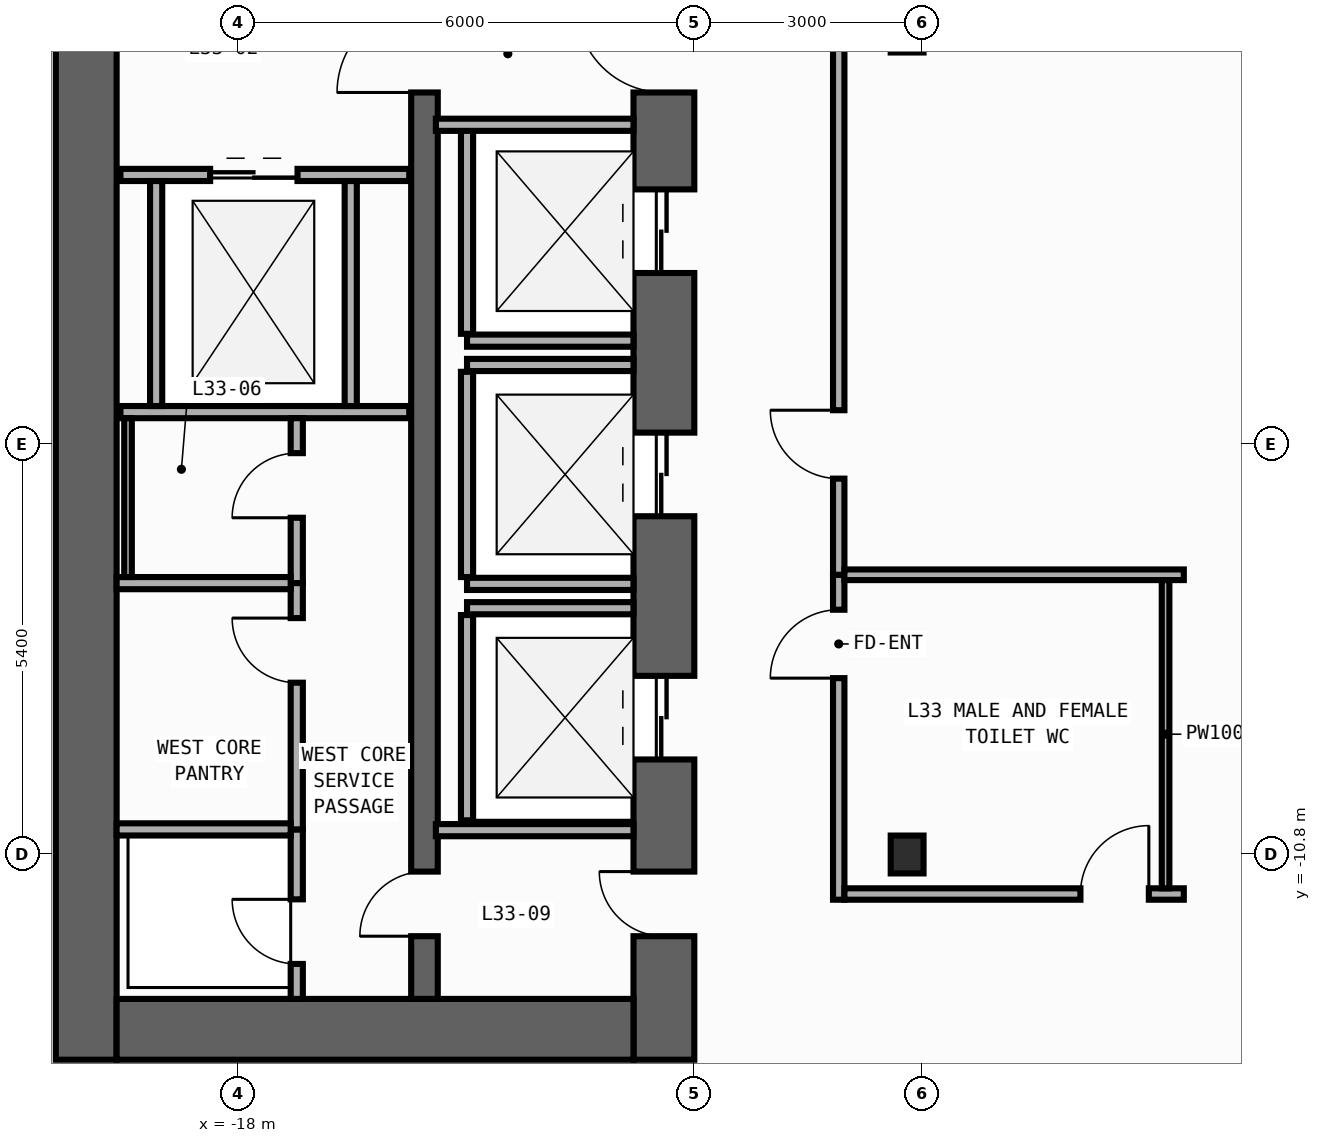
"""IFC4 building model, lengths in metres.
Left out: names, types, materials, properties, quantities, classifications, styles, units other than length and angle.
Written with IfcOpenShell. Run it as: python <this file> out.ifc"""

import sys

from ifc_helpers import new_model, si_unit, direction, frame, frame_2d, origin, origin_2d, place, context, subcontext, project, spatial, rectangle, i_section, extrude, element, fill, save


model = new_model("IFC4")
c1 = context("Model", 3, precision=1e-05, world=origin(), true_north=direction((0.0, 1.0)))
c2 = subcontext(c1, "Body", "Model", "MODEL_VIEW")
j1 = project(units=[si_unit("LENGTHUNIT", "METRE"), si_unit("PLANEANGLEUNIT", "RADIAN")], contexts=[c1])
p1 = place(None, origin())
s1 = spatial("IfcSite", under=j1, at=p1, CompositionType="ELEMENT")
p2 = place(p1, origin())
s2 = spatial("IfcBuilding", under=s1, at=p2, CompositionType="ELEMENT")
p3 = place(p2, frame((0.0, 0.0, 143.6)))
s3 = spatial("IfcBuildingStorey", under=s2, at=p3, CompositionType="ELEMENT", Elevation=143.6)
p4 = place(p3, frame((-20.0, -13.5, 0.0), z_axis=(0.0, 0.0, 1.0), x_axis=(0.0, 1.0, 0.0)))
e1 = element("IfcWall", 1, at=p4, inside=s3, PredefinedType="SHEAR", context=c2, shape_type="SweptSolid", body=[
    extrude(rectangle(XDim=27.0, YDim=0.8, at=frame_2d((13.5, 0.0))), origin(), (0.0, 0.0, 1.0), 3.94),
])
p5 = place(p3, frame((-12.4, -13.5, 0.0), z_axis=(0.0, 0.0, 1.0), x_axis=(0.0, 1.0, 0.0)))
e2 = element("IfcWall", 2, at=p5, inside=s3, PredefinedType="SHEAR", context=c2, shape_type="SweptSolid", body=[
    extrude(rectangle(XDim=27.0, YDim=0.8, at=frame_2d((13.5, 0.0))), origin(), (0.0, 0.0, 1.0), 3.94),
])
p6 = place(p5, frame((10.35, 0.0, 0.0)))
e3 = element("IfcOpeningElement", 3, at=p6, cuts=e2, PredefinedType="OPENING", context=c2, shape_type="SweptSolid", body=[
    extrude(rectangle(XDim=1.1, YDim=2.2, at=frame_2d((0.55, 1.1))), frame((0.0, 0.41, 0.0), z_axis=(0.0, -1.0, 0.0), x_axis=(1.0, 0.0, 0.0)), (0.0, 0.0, 1.0), 0.82),
])
p7 = place(p5, frame((7.15, 0.0, 0.0)))
e4 = element("IfcOpeningElement", 4, at=p7, cuts=e2, PredefinedType="OPENING", context=c2, shape_type="SweptSolid", body=[
    extrude(rectangle(XDim=1.1, YDim=2.2, at=frame_2d((0.55, 1.1))), frame((0.0, 0.41, 0.0), z_axis=(0.0, -1.0, 0.0), x_axis=(1.0, 0.0, 0.0)), (0.0, 0.0, 1.0), 0.82),
])
p8 = place(p5, frame((3.95, 0.0, 0.0)))
e5 = element("IfcOpeningElement", 5, at=p8, cuts=e2, PredefinedType="OPENING", context=c2, shape_type="SweptSolid", body=[
    extrude(rectangle(XDim=1.1, YDim=2.2, at=frame_2d((0.55, 1.1))), frame((0.0, 0.41, 0.0), z_axis=(0.0, -1.0, 0.0), x_axis=(1.0, 0.0, 0.0)), (0.0, 0.0, 1.0), 0.82),
])
p9 = place(p5, frame((15.175, 0.0, 0.0)))
e6 = element("IfcOpeningElement", 6, at=p9, cuts=e2, PredefinedType="OPENING", context=c2, shape_type="SweptSolid", body=[
    extrude(rectangle(XDim=0.85, YDim=2.1, at=frame_2d((0.425, 1.05))), frame((0.0, 0.41, 0.0), z_axis=(0.0, -1.0, 0.0), x_axis=(1.0, 0.0, 0.0)), (0.0, 0.0, 1.0), 0.82),
])
p10 = place(p5, frame((21.275, 0.0, 0.0)))
e7 = element("IfcOpeningElement", 7, at=p10, cuts=e2, PredefinedType="OPENING", context=c2, shape_type="SweptSolid", body=[
    extrude(rectangle(XDim=0.85, YDim=2.1, at=frame_2d((0.425, 1.05))), frame((0.0, 0.41, 0.0), z_axis=(0.0, -1.0, 0.0), x_axis=(1.0, 0.0, 0.0)), (0.0, 0.0, 1.0), 0.82),
])
p11 = place(p5, frame((12.725, 0.0, 0.0)))
e8 = element("IfcOpeningElement", 8, at=p11, cuts=e2, PredefinedType="OPENING", context=c2, shape_type="SweptSolid", body=[
    extrude(rectangle(XDim=1.15, YDim=2.2, at=frame_2d((0.575, 1.1))), frame((0.0, 0.41, 0.0), z_axis=(0.0, -1.0, 0.0), x_axis=(1.0, 0.0, 0.0)), (0.0, 0.0, 1.0), 0.82),
])
p12 = place(p5, frame((1.625, 0.0, 0.0)))
e9 = element("IfcOpeningElement", 9, at=p12, cuts=e2, PredefinedType="OPENING", context=c2, shape_type="SweptSolid", body=[
    extrude(rectangle(XDim=0.85, YDim=2.1, at=frame_2d((0.425, 1.05))), frame((0.0, 0.41, 0.0), z_axis=(0.0, -1.0, 0.0), x_axis=(1.0, 0.0, 0.0)), (0.0, 0.0, 1.0), 0.82),
])
p13 = place(p3, frame((-19.6, -13.1, 0.0), z_axis=(0.0, 0.0, 1.0), x_axis=(1.0, 0.0, 0.0)))
e10 = element("IfcWall", 10, at=p13, inside=s3, PredefinedType="SHEAR", context=c2, shape_type="SweptSolid", body=[
    extrude(rectangle(XDim=6.8, YDim=0.8, at=frame_2d((3.4, 0.0))), origin(), (0.0, 0.0, 1.0), 3.94),
])
p14 = place(p3, frame((-15.55, -12.7, 0.0), z_axis=(0.0, 0.0, 1.0), x_axis=(0.0, 1.0, 0.0)))
e11 = element("IfcWall", 11, at=p14, inside=s3, PredefinedType="SHEAR", context=c2, shape_type="SweptSolid", body=[
    extrude(rectangle(XDim=25.4, YDim=0.35, at=frame_2d((12.7, 0.0))), origin(), (0.0, 0.0, 1.0), 3.94),
])
p15 = place(p14, frame((11.925, 0.0, 0.0)))
e12 = element("IfcOpeningElement", 12, at=p15, cuts=e11, PredefinedType="OPENING", context=c2, shape_type="SweptSolid", body=[
    extrude(rectangle(XDim=1.15, YDim=2.2, at=frame_2d((0.575, 1.1))), frame((0.0, 0.185, 0.0), z_axis=(0.0, -1.0, 0.0), x_axis=(1.0, 0.0, 0.0)), (0.0, 0.0, 1.0), 0.37),
])
p16 = place(p14, frame((0.825, 0.0, 0.0)))
e13 = element("IfcOpeningElement", 13, at=p16, cuts=e11, PredefinedType="OPENING", context=c2, shape_type="SweptSolid", body=[
    extrude(rectangle(XDim=0.85, YDim=2.1, at=frame_2d((0.425, 1.05))), frame((0.0, 0.185, 0.0), z_axis=(0.0, -1.0, 0.0), x_axis=(1.0, 0.0, 0.0)), (0.0, 0.0, 1.0), 0.37),
])
p17 = place(p3, frame((-9.2, -10.8, 0.0), z_axis=(0.0, 0.0, 1.0), x_axis=(1.0, 0.0, 0.0)))
e14 = element("IfcColumn", 14, at=p17, inside=s3, PredefinedType="COLUMN", context=c2, shape_type="SweptSolid", body=[
    extrude(i_section(OverallWidth=0.432, OverallDepth=0.498, WebThickness=0.045, FlangeThickness=0.07, FilletRadius=0.022, at=origin_2d()), origin(), (0.0, 0.0, 1.0), 4.2),
])
p18 = place(p3, frame((-14.99, -4.04, 0.0), z_axis=(0.0, 0.0, 1.0), x_axis=(1.0, 0.0, 0.0)))
e15 = element("IfcWall", 15, at=p18, inside=s3, PredefinedType="STANDARD", context=c2, shape_type="SweptSolid", body=[
    extrude(rectangle(XDim=2.19, YDim=0.16, at=frame_2d((1.095, 0.0))), origin(), (0.0, 0.0, 1.0), 3.94),
])
p19 = place(p3, frame((-14.99, -3.95, 0.0), z_axis=(0.0, 0.0, 1.0), x_axis=(0.0, 1.0, 0.0)))
e16 = element("IfcWall", 16, at=p19, inside=s3, PredefinedType="STANDARD", context=c2, shape_type="SweptSolid", body=[
    extrude(rectangle(XDim=2.7, YDim=0.16, at=frame_2d((1.35, 0.0))), origin(), (0.0, 0.0, 1.0), 3.94),
])
for number, where, z_axis, x_axis in (
    (17, (-14.99, -7.24, 0.0), (0.0, 0.0, 1.0), (1.0, 0.0, 0.0)),
    (18, (-14.99, -4.36, 0.0), (0.0, 0.0, 1.0), (1.0, 0.0, 0.0)),
):
    element("IfcWall", number, at=place(p3, frame(where, z_axis=z_axis, x_axis=x_axis)), inside=s3, PredefinedType="STANDARD", context=c2, shape_type="SweptSolid", body=[
        extrude(rectangle(XDim=2.19, YDim=0.16, at=frame_2d((1.095, 0.0))), origin(), (0.0, 0.0, 1.0), 3.94),
    ])
p20 = place(p3, frame((-14.99, -7.15, 0.0), z_axis=(0.0, 0.0, 1.0), x_axis=(0.0, 1.0, 0.0)))
e19 = element("IfcWall", 19, at=p20, inside=s3, PredefinedType="STANDARD", context=c2, shape_type="SweptSolid", body=[
    extrude(rectangle(XDim=2.7, YDim=0.16, at=frame_2d((1.35, 0.0))), origin(), (0.0, 0.0, 1.0), 3.94),
])
p21 = place(p3, frame((-14.99, -7.56, 0.0), z_axis=(0.0, 0.0, 1.0), x_axis=(1.0, 0.0, 0.0)))
e20 = element("IfcWall", 20, at=p21, inside=s3, PredefinedType="STANDARD", context=c2, shape_type="SweptSolid", body=[
    extrude(rectangle(XDim=2.19, YDim=0.16, at=frame_2d((1.095, 0.0))), origin(), (0.0, 0.0, 1.0), 3.94),
])
p22 = place(p3, frame((-14.99, -10.35, 0.0), z_axis=(0.0, 0.0, 1.0), x_axis=(0.0, 1.0, 0.0)))
e21 = element("IfcWall", 21, at=p22, inside=s3, PredefinedType="STANDARD", context=c2, shape_type="SweptSolid", body=[
    extrude(rectangle(XDim=2.7, YDim=0.16, at=frame_2d((1.35, 0.0))), origin(), (0.0, 0.0, 1.0), 3.94),
])
p23 = place(p3, frame((-19.55, -1.86, 0.0), z_axis=(0.0, 0.0, 1.0), x_axis=(1.0, 0.0, 0.0)))
e22 = element("IfcWall", 22, at=p23, inside=s3, PredefinedType="STANDARD", context=c2, shape_type="SweptSolid", body=[
    extrude(rectangle(XDim=3.8, YDim=0.16, at=frame_2d((1.9, 0.0))), origin(), (0.0, 0.0, 1.0), 3.94),
])
p24 = place(p23, frame((1.18, 0.0, 0.0)))
e23 = element("IfcOpeningElement", 23, at=p24, cuts=e22, PredefinedType="OPENING", context=c2, shape_type="SweptSolid", body=[
    extrude(rectangle(XDim=1.15, YDim=2.2, at=frame_2d((0.575, 1.1))), frame((0.0, 0.09, 0.0), z_axis=(0.0, -1.0, 0.0), x_axis=(1.0, 0.0, 0.0)), (0.0, 0.0, 1.0), 0.18),
])
p25 = place(p3, frame((-19.55, -4.98, 0.0), z_axis=(0.0, 0.0, 1.0), x_axis=(1.0, 0.0, 0.0)))
e24 = element("IfcWall", 24, at=p25, inside=s3, PredefinedType="STANDARD", context=c2, shape_type="SweptSolid", body=[
    extrude(rectangle(XDim=3.8, YDim=0.16, at=frame_2d((1.9, 0.0))), origin(), (0.0, 0.0, 1.0), 3.94),
])
for number, where, z_axis, x_axis in (
    (25, (-19.08, -4.9, 0.0), (0.0, 0.0, 1.0), (0.0, 1.0, 0.0)),
    (26, (-16.52, -4.9, 0.0), (0.0, 0.0, 1.0), (0.0, 1.0, 0.0)),
):
    element("IfcWall", number, at=place(p3, frame(where, z_axis=z_axis, x_axis=x_axis)), inside=s3, PredefinedType="STANDARD", context=c2, shape_type="SweptSolid", body=[
        extrude(rectangle(XDim=2.96, YDim=0.16, at=frame_2d((1.48, 0.0))), origin(), (0.0, 0.0, 1.0), 3.94),
    ])
for number, where, z_axis, x_axis in (
    (27, (-15.4, -1.2, 0.0), (0.0, 0.0, 1.0), (1.0, 0.0, 0.0)),
    (28, (-15.4, -10.48, 0.0), (0.0, 0.0, 1.0), (1.0, 0.0, 0.0)),
):
    element("IfcWall", number, at=place(p3, frame(where, z_axis=z_axis, x_axis=x_axis)), inside=s3, PredefinedType="STANDARD", context=c2, shape_type="SweptSolid", body=[
        extrude(rectangle(XDim=2.6, YDim=0.16, at=frame_2d((1.3, 0.0))), origin(), (0.0, 0.0, 1.0), 3.94),
    ])
p26 = place(p3, frame((-17.23, -12.7, 0.0), z_axis=(0.0, 0.0, 1.0), x_axis=(0.0, 1.0, 0.0)))
e29 = element("IfcWall", 29, at=p26, inside=s3, PredefinedType="PARTITIONING", context=c2, shape_type="SweptSolid", body=[
    extrude(rectangle(XDim=2.23, YDim=0.16, at=frame_2d((1.115, 0.0))), origin(), (0.0, 0.0, 1.0), 3.94),
])
p27 = place(p26, frame((0.46, 0.0, 0.0)))
e30 = element("IfcOpeningElement", 30, at=p27, cuts=e29, PredefinedType="OPENING", context=c2, shape_type="SweptSolid", body=[
    extrude(rectangle(XDim=0.85, YDim=2.1, at=frame_2d((0.425, 1.05))), frame((0.0, 0.09, 0.0), z_axis=(0.0, -1.0, 0.0), x_axis=(1.0, 0.0, 0.0)), (0.0, 0.0, 1.0), 0.18),
])
p28 = place(p3, frame((-17.23, -7.23, 0.0), z_axis=(0.0, 0.0, 1.0), x_axis=(0.0, 1.0, 0.0)))
e31 = element("IfcWall", 31, at=p28, inside=s3, PredefinedType="PARTITIONING", context=c2, shape_type="SweptSolid", body=[
    extrude(rectangle(XDim=2.17, YDim=0.16, at=frame_2d((1.085, 0.0))), origin(), (0.0, 0.0, 1.0), 3.94),
])
p29 = place(p28, frame((0.86, 0.0, 0.0)))
e32 = element("IfcOpeningElement", 32, at=p29, cuts=e31, PredefinedType="OPENING", context=c2, shape_type="SweptSolid", body=[
    extrude(rectangle(XDim=0.85, YDim=2.1, at=frame_2d((0.425, 1.05))), frame((0.0, 0.09, 0.0), z_axis=(0.0, -1.0, 0.0), x_axis=(1.0, 0.0, 0.0)), (0.0, 0.0, 1.0), 0.18),
])
p30 = place(p3, frame((-17.23, -10.47, 0.0), z_axis=(0.0, 0.0, 1.0), x_axis=(0.0, 1.0, 0.0)))
e33 = element("IfcWall", 33, at=p30, inside=s3, PredefinedType="PARTITIONING", context=c2, shape_type="SweptSolid", body=[
    extrude(rectangle(XDim=3.24, YDim=0.16, at=frame_2d((1.62, 0.0))), origin(), (0.0, 0.0, 1.0), 3.94),
])
p31 = place(p30, frame((1.93, 0.0, 0.0)))
e34 = element("IfcOpeningElement", 34, at=p31, cuts=e33, PredefinedType="OPENING", context=c2, shape_type="SweptSolid", body=[
    extrude(rectangle(XDim=0.85, YDim=2.1, at=frame_2d((0.425, 1.05))), frame((0.0, 0.09, 0.0), z_axis=(0.0, -1.0, 0.0), x_axis=(1.0, 0.0, 0.0)), (0.0, 0.0, 1.0), 0.18),
])
for number, where, z_axis, x_axis in (
    (35, (-19.6, -10.47, 0.0), (0.0, 0.0, 1.0), (1.0, 0.0, 0.0)),
    (36, (-19.6, -7.23, 0.0), (0.0, 0.0, 1.0), (1.0, 0.0, 0.0)),
):
    element("IfcWall", number, at=place(p3, frame(where, z_axis=z_axis, x_axis=x_axis)), inside=s3, PredefinedType="PARTITIONING", context=c2, shape_type="SweptSolid", body=[
        extrude(rectangle(XDim=2.29, YDim=0.16, at=frame_2d((1.145, 0.0))), origin(), (0.0, 0.0, 1.0), 3.94),
    ])
p32 = place(p3, frame((-10.1, -11.395, 0.0), z_axis=(0.0, 0.0, 1.0), x_axis=(0.0, 1.0, 0.0)))
e37 = element("IfcWall", 37, at=p32, inside=s3, PredefinedType="PARTITIONING", context=c2, shape_type="SweptSolid", body=[
    extrude(rectangle(XDim=4.275, YDim=0.15, at=frame_2d((2.137, 0.0))), origin(), (0.0, 0.0, 1.0), 3.94),
])
p33 = place(p32, frame((2.915, 0.0, 0.0)))
e38 = element("IfcOpeningElement", 38, at=p33, cuts=e37, PredefinedType="OPENING", context=c2, shape_type="SweptSolid", body=[
    extrude(rectangle(XDim=0.9, YDim=2.15, at=frame_2d((0.45, 1.075))), frame((0.0, 0.085, 0.0), z_axis=(0.0, -1.0, 0.0), x_axis=(1.0, 0.0, 0.0)), (0.0, 0.0, 1.0), 0.17),
])
p34 = place(p3, frame((-10.1, -7.12, 0.0), z_axis=(0.0, 0.0, 1.0), x_axis=(0.0, 1.0, 0.0)))
e39 = element("IfcWall", 39, at=p34, inside=s3, PredefinedType="PARTITIONING", context=c2, shape_type="SweptSolid", body=[
    extrude(rectangle(XDim=17.915, YDim=0.15, at=frame_2d((8.958, 0.0))), origin(), (0.0, 0.0, 1.0), 3.94),
])
p35 = place(p34, frame((1.265, 0.0, 0.0)))
e40 = element("IfcOpeningElement", 40, at=p35, cuts=e39, PredefinedType="OPENING", context=c2, shape_type="SweptSolid", body=[
    extrude(rectangle(XDim=0.9, YDim=2.15, at=frame_2d((0.45, 1.075))), frame((0.0, 0.085, 0.0), z_axis=(0.0, -1.0, 0.0), x_axis=(1.0, 0.0, 0.0)), (0.0, 0.0, 1.0), 0.17),
])
p36 = place(p3, frame((-10.025, -11.32, 0.0), z_axis=(0.0, 0.0, 1.0), x_axis=(1.0, 0.0, 0.0)))
e41 = element("IfcWall", 41, at=p36, inside=s3, PredefinedType="PARTITIONING", context=c2, shape_type="SweptSolid", body=[
    extrude(rectangle(XDim=4.465, YDim=0.15, at=frame_2d((2.232, 0.0))), origin(), (0.0, 0.0, 1.0), 3.94),
])
p37 = place(p36, frame((3.105, 0.0, 0.0)))
e42 = element("IfcOpeningElement", 42, at=p37, cuts=e41, PredefinedType="OPENING", context=c2, shape_type="SweptSolid", body=[
    extrude(rectangle(XDim=0.9, YDim=2.15, at=frame_2d((0.45, 1.075))), frame((0.0, 0.085, 0.0), z_axis=(0.0, -1.0, 0.0), x_axis=(1.0, 0.0, 0.0)), (0.0, 0.0, 1.0), 0.17),
])
p38 = place(p3, frame((-10.025, -7.12, 0.0), z_axis=(0.0, 0.0, 1.0), x_axis=(1.0, 0.0, 0.0)))
e43 = element("IfcWall", 43, at=p38, inside=s3, PredefinedType="PARTITIONING", context=c2, shape_type="SweptSolid", body=[
    extrude(rectangle(XDim=4.465, YDim=0.14, at=frame_2d((2.232, 0.0))), origin(), (0.0, 0.0, 1.0), 3.94),
])
p39 = place(p3, frame((-19.45, -7.15, 0.0), z_axis=(0.0, 0.0, 1.0), x_axis=(0.0, 1.0, 0.0)))
e44 = element("IfcWall", 44, at=p39, inside=s3, PredefinedType="PARTITIONING", context=c2, shape_type="SweptSolid", body=[
    extrude(rectangle(XDim=2.09, YDim=0.1, at=frame_2d((1.045, 0.0))), origin(), (0.0, 0.0, 1.0), 3.94),
])
p40 = place(p3, frame((-5.8, -7.19, 0.0), z_axis=(0.0, 0.0, 1.0), x_axis=(0.0, -1.0, 0.0)))
e45 = element("IfcWall", 45, at=p40, inside=s3, PredefinedType="PARTITIONING", context=c2, shape_type="SweptSolid", body=[
    extrude(rectangle(XDim=4.055, YDim=0.1, at=frame_2d((2.028, 0.0))), origin(), (0.0, 0.0, 1.0), 3.94),
])
p41 = place(p6, origin())
e46 = element("IfcDoor", 46, at=p41, inside=s3, OperationType="DOUBLE_DOOR_SLIDING", PredefinedType="DOOR", context=c2, shape_type="SweptSolid", body=[
    extrude(rectangle(XDim=1.1, YDim=2.2, at=frame_2d((0.55, 1.1))), frame((0.0, 0.025, 0.0), z_axis=(0.0, -1.0, 0.0), x_axis=(1.0, 0.0, 0.0)), (0.0, 0.0, 1.0), 0.05),
])
fill(e3, e46)
p42 = place(p7, origin())
e47 = element("IfcDoor", 47, at=p42, inside=s3, OperationType="DOUBLE_DOOR_SLIDING", PredefinedType="DOOR", context=c2, shape_type="SweptSolid", body=[
    extrude(rectangle(XDim=1.1, YDim=2.2, at=frame_2d((0.55, 1.1))), frame((0.0, 0.025, 0.0), z_axis=(0.0, -1.0, 0.0), x_axis=(1.0, 0.0, 0.0)), (0.0, 0.0, 1.0), 0.05),
])
fill(e4, e47)
p43 = place(p8, origin())
e48 = element("IfcDoor", 48, at=p43, inside=s3, OperationType="DOUBLE_DOOR_SLIDING", PredefinedType="DOOR", context=c2, shape_type="SweptSolid", body=[
    extrude(rectangle(XDim=1.1, YDim=2.2, at=frame_2d((0.55, 1.1))), frame((0.0, 0.025, 0.0), z_axis=(0.0, -1.0, 0.0), x_axis=(1.0, 0.0, 0.0)), (0.0, 0.0, 1.0), 0.05),
])
fill(e5, e48)
p44 = place(p11, origin())
e49 = element("IfcDoor", 49, at=p44, inside=s3, OperationType="SINGLE_SWING_RIGHT", PredefinedType="DOOR", context=c2, shape_type="SweptSolid", body=[
    extrude(rectangle(XDim=1.15, YDim=2.2, at=frame_2d((0.575, 1.1))), frame((0.0, 0.025, 0.0), z_axis=(0.0, -1.0, 0.0), x_axis=(1.0, 0.0, 0.0)), (0.0, 0.0, 1.0), 0.05),
])
fill(e8, e49)
p45 = place(p15, origin())
e50 = element("IfcDoor", 50, at=p45, inside=s3, OperationType="SINGLE_SWING_LEFT", PredefinedType="DOOR", context=c2, shape_type="SweptSolid", body=[
    extrude(rectangle(XDim=1.15, YDim=2.2, at=frame_2d((0.575, 1.1))), frame((0.0, 0.025, 0.0), z_axis=(0.0, -1.0, 0.0), x_axis=(1.0, 0.0, 0.0)), (0.0, 0.0, 1.0), 0.05),
])
fill(e12, e50)
p46 = place(p12, origin())
e51 = element("IfcDoor", 51, at=p46, inside=s3, OperationType="SINGLE_SWING_RIGHT", PredefinedType="DOOR", context=c2, shape_type="SweptSolid", body=[
    extrude(rectangle(XDim=0.85, YDim=2.1, at=frame_2d((0.425, 1.05))), frame((0.0, 0.025, 0.0), z_axis=(0.0, -1.0, 0.0), x_axis=(1.0, 0.0, 0.0)), (0.0, 0.0, 1.0), 0.05),
])
fill(e9, e51)
p47 = place(p16, origin())
e52 = element("IfcDoor", 52, at=p47, inside=s3, OperationType="SINGLE_SWING_LEFT", PredefinedType="DOOR", context=c2, shape_type="SweptSolid", body=[
    extrude(rectangle(XDim=0.85, YDim=2.1, at=frame_2d((0.425, 1.05))), frame((0.0, 0.025, 0.0), z_axis=(0.0, -1.0, 0.0), x_axis=(1.0, 0.0, 0.0)), (0.0, 0.0, 1.0), 0.05),
])
fill(e13, e52)
p48 = place(p24, origin())
e53 = element("IfcDoor", 53, at=p48, inside=s3, OperationType="DOUBLE_DOOR_SLIDING", PredefinedType="DOOR", context=c2, shape_type="SweptSolid", body=[
    extrude(rectangle(XDim=1.15, YDim=2.2, at=frame_2d((0.575, 1.1))), frame((0.0, 0.025, 0.0), z_axis=(0.0, -1.0, 0.0), x_axis=(1.0, 0.0, 0.0)), (0.0, 0.0, 1.0), 0.05),
])
fill(e23, e53)
p49 = place(p27, origin())
e54 = element("IfcDoor", 54, at=p49, inside=s3, OperationType="SINGLE_SWING_RIGHT", PredefinedType="DOOR", context=c2, shape_type="SweptSolid", body=[
    extrude(rectangle(XDim=0.85, YDim=2.1, at=frame_2d((0.425, 1.05))), frame((0.0, 0.025, 0.0), z_axis=(0.0, -1.0, 0.0), x_axis=(1.0, 0.0, 0.0)), (0.0, 0.0, 1.0), 0.05),
])
fill(e30, e54)
p50 = place(p29, origin())
e55 = element("IfcDoor", 55, at=p50, inside=s3, OperationType="SINGLE_SWING_LEFT", PredefinedType="DOOR", context=c2, shape_type="SweptSolid", body=[
    extrude(rectangle(XDim=0.85, YDim=2.1, at=frame_2d((0.425, 1.05))), frame((0.0, 0.025, 0.0), z_axis=(0.0, -1.0, 0.0), x_axis=(1.0, 0.0, 0.0)), (0.0, 0.0, 1.0), 0.05),
])
fill(e32, e55)
p51 = place(p31, origin())
e56 = element("IfcDoor", 56, at=p51, inside=s3, OperationType="SINGLE_SWING_RIGHT", PredefinedType="DOOR", context=c2, shape_type="SweptSolid", body=[
    extrude(rectangle(XDim=0.85, YDim=2.1, at=frame_2d((0.425, 1.05))), frame((0.0, 0.025, 0.0), z_axis=(0.0, -1.0, 0.0), x_axis=(1.0, 0.0, 0.0)), (0.0, 0.0, 1.0), 0.05),
])
fill(e34, e56)
p52 = place(p33, origin())
e57 = element("IfcDoor", 57, at=p52, inside=s3, OperationType="SINGLE_SWING_LEFT", PredefinedType="DOOR", context=c2, shape_type="SweptSolid", body=[
    extrude(rectangle(XDim=0.9, YDim=2.15, at=frame_2d((0.45, 1.075))), frame((0.0, 0.025, 0.0), z_axis=(0.0, -1.0, 0.0), x_axis=(1.0, 0.0, 0.0)), (0.0, 0.0, 1.0), 0.05),
])
fill(e38, e57)
p53 = place(p35, origin())
e58 = element("IfcDoor", 58, at=p53, inside=s3, OperationType="SINGLE_SWING_RIGHT", PredefinedType="DOOR", context=c2, shape_type="SweptSolid", body=[
    extrude(rectangle(XDim=0.9, YDim=2.15, at=frame_2d((0.45, 1.075))), frame((0.0, 0.025, 0.0), z_axis=(0.0, -1.0, 0.0), x_axis=(1.0, 0.0, 0.0)), (0.0, 0.0, 1.0), 0.05),
])
fill(e40, e58)
p54 = place(p37, origin())
e59 = element("IfcDoor", 59, at=p54, inside=s3, OperationType="SINGLE_SWING_RIGHT", PredefinedType="DOOR", context=c2, shape_type="SweptSolid", body=[
    extrude(rectangle(XDim=0.9, YDim=2.15, at=frame_2d((0.45, 1.075))), frame((0.0, 0.025, 0.0), z_axis=(0.0, -1.0, 0.0), x_axis=(1.0, 0.0, 0.0)), (0.0, 0.0, 1.0), 0.05),
])
fill(e42, e59)
save(model, sys.argv[1])
